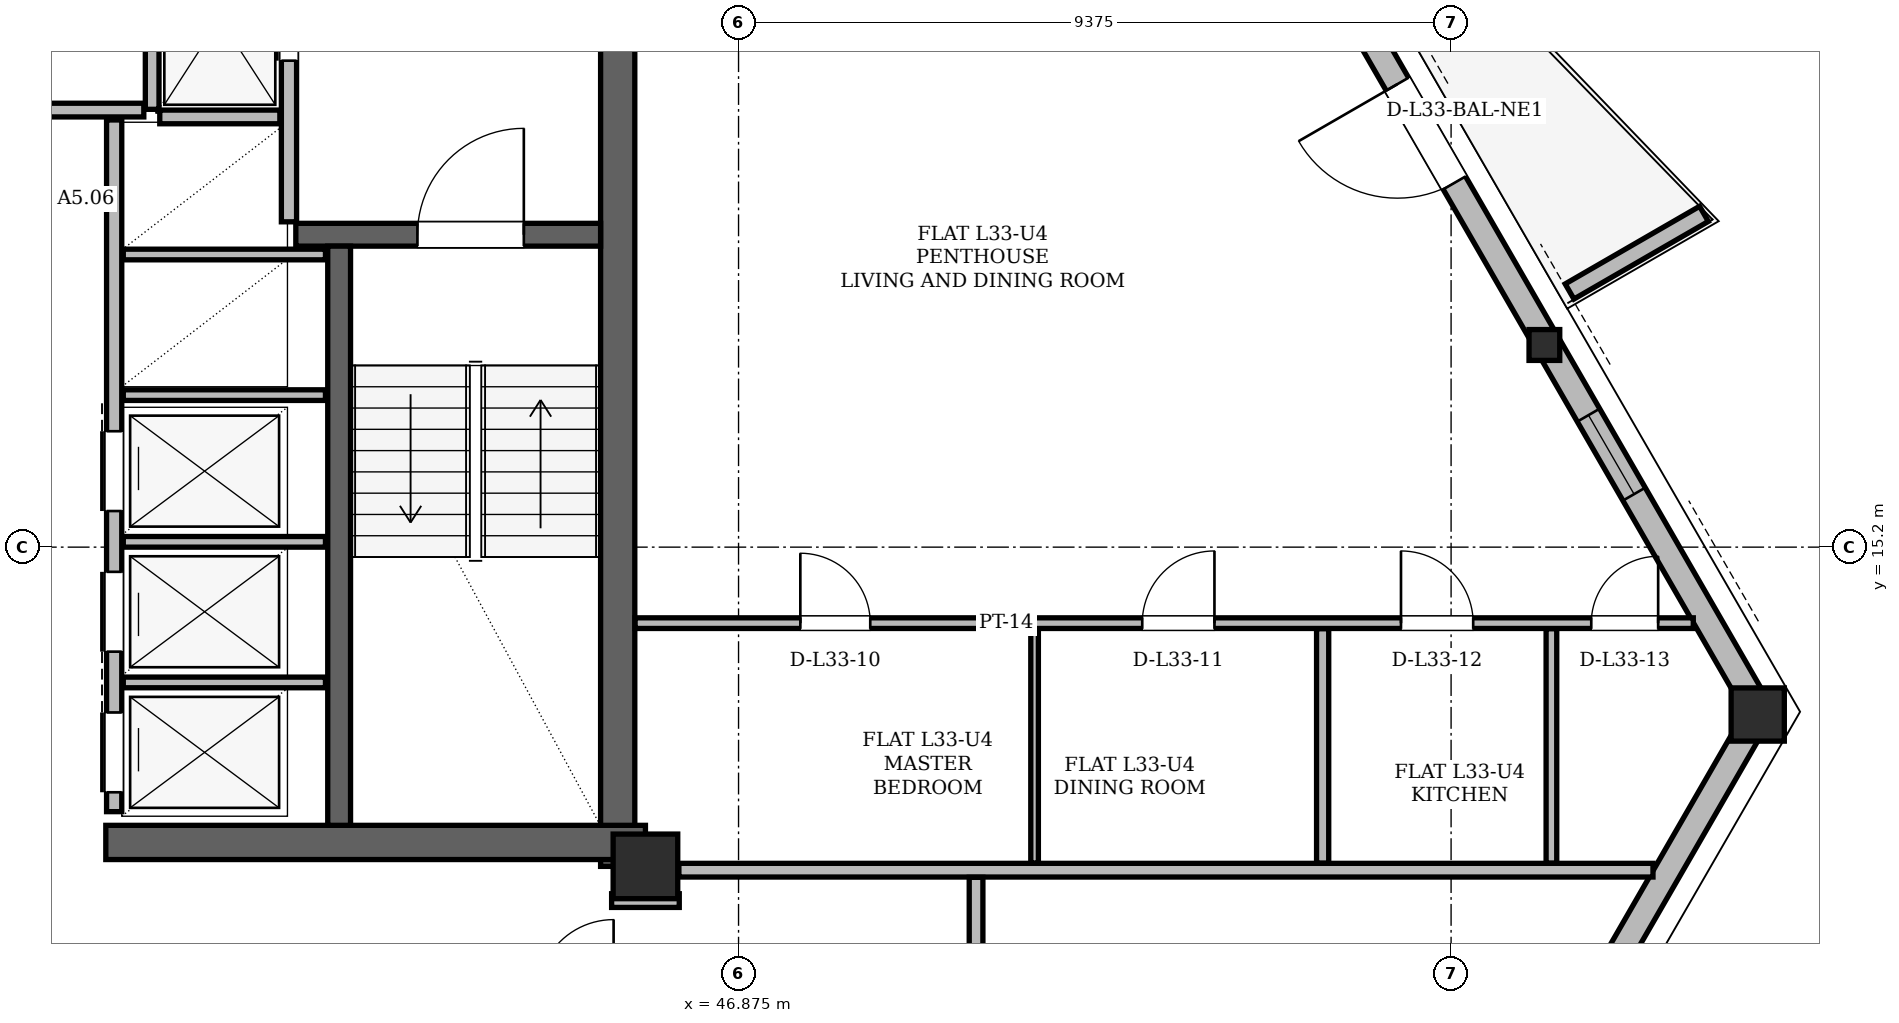
"""IFC4 building model, lengths in metres.
Left out: names, types, materials, properties, quantities, classifications, styles, units other than length and angle.
Written with IfcOpenShell. Run it as: python <this file> out.ifc"""

import sys

from ifc_helpers import new_model, si_unit, direction, frame, frame_2d, origin, origin_2d, place, context, subcontext, project, spatial, polyline, rectangle, hollow_rectangle, i_section, outline, extrude, element, fill, save


model = new_model("IFC4")
c1 = context("Model", 3, precision=1e-05, world=origin(), true_north=direction((0.0, 1.0)))
c2 = subcontext(c1, "Body", "Model", "MODEL_VIEW")
j1 = project(units=[si_unit("LENGTHUNIT", "METRE"), si_unit("PLANEANGLEUNIT", "RADIAN")], contexts=[c1])
p1 = place(None, origin())
s1 = spatial("IfcSite", under=j1, at=p1, CompositionType="ELEMENT")
p2 = place(p1, origin())
s2 = spatial("IfcBuilding", under=s1, at=p2, CompositionType="ELEMENT")
p3 = place(p2, frame((0.0, 0.0, 126.6)))
s3 = spatial("IfcBuildingStorey", under=s2, at=p3, CompositionType="ELEMENT", Elevation=126.6)
p4 = place(p3, frame((45.65, 11.0, 0.0), z_axis=(0.0, 0.0, 1.0), x_axis=(1.0, 0.0, 0.0)))
e1 = element("IfcColumn", 1, at=p4, inside=s3, PredefinedType="COLUMN", context=c2, shape_type="SweptSolid", body=[
    extrude(hollow_rectangle(XDim=0.85, YDim=0.85, WallThickness=0.07, at=origin_2d()), origin(), (0.0, 0.0, 1.0), 3.6),
])
p5 = place(p3, frame((60.311, 13.034, 0.004), z_axis=(-0.014612382171, -0.020117512198, 0.999690834203), x_axis=(0.809090542382, -0.587684008825, 0.0)))
e2 = element("IfcColumn", 2, at=p5, inside=s3, PredefinedType="COLUMN", context=c2, shape_type="SweptSolid", body=[
    extrude(hollow_rectangle(XDim=0.7, YDim=0.7, WallThickness=0.055, at=origin_2d()), origin(), (0.0, 0.0, 1.0), 3.592),
])
p6 = place(p3, frame((57.507, 17.891, 0.004), z_axis=(-0.01617604101, -0.017263505952, 0.999720114362), x_axis=(0.729716361997, -0.68374997699, 0.0)))
e3 = element("IfcColumn", 3, at=p6, inside=s3, PredefinedType="COLUMN", context=c2, shape_type="SweptSolid", body=[
    extrude(i_section(OverallWidth=0.404, OverallDepth=0.406, WebThickness=0.027, FlangeThickness=0.044, at=origin_2d()), origin(), (0.0, 0.0, 1.0), 3.592),
])
p7 = place(p3, frame((45.285, 11.0, 0.0), z_axis=(0.0, 0.0, 1.0), x_axis=(0.0, 1.0, 0.0)))
e4 = element("IfcWall", 4, at=p7, inside=s3, PredefinedType="SHEAR", context=c2, shape_type="SweptSolid", body=[
    extrude(rectangle(XDim=13.3, YDim=0.45, at=frame_2d((6.65, 0.0))), origin(), (0.0, 0.0, 1.0), 3.36),
])
p8 = place(p3, frame((38.55, 11.315, 0.0), z_axis=(0.0, 0.0, 1.0), x_axis=(1.0, 0.0, 0.0)))
e5 = element("IfcWall", 5, at=p8, inside=s3, PredefinedType="SHEAR", context=c2, shape_type="SweptSolid", body=[
    extrude(rectangle(XDim=7.1, YDim=0.45, at=frame_2d((3.55, 0.0))), origin(), (0.0, 0.0, 1.0), 3.36),
])
p9 = place(p3, frame((41.05, 19.31, 0.0), z_axis=(0.0, 0.0, 1.0), x_axis=(1.0, 0.0, 0.0)))
e6 = element("IfcWall", 6, at=p9, inside=s3, PredefinedType="SHEAR", context=c2, shape_type="SweptSolid", body=[
    extrude(rectangle(XDim=4.01, YDim=0.3, at=frame_2d((2.005, 0.0))), origin(), (0.0, 0.0, 1.0), 3.36),
])
p10 = place(p9, frame((1.6, 0.0, 0.0)))
e7 = element("IfcOpeningElement", 7, at=p10, cuts=e6, PredefinedType="OPENING", context=c2, shape_type="SweptSolid", body=[
    extrude(rectangle(XDim=1.4, YDim=2.2, at=frame_2d((0.7, 1.1))), frame((0.0, 0.15, 0.0), z_axis=(0.0, -1.0, 0.0), x_axis=(1.0, 0.0, 0.0)), (0.0, 0.0, 1.0), 0.3),
])
p11 = place(p3, frame((41.62, 11.54, 0.0), z_axis=(0.0, 0.0, 1.0), x_axis=(0.0, 1.0, 0.0)))
e8 = element("IfcWall", 8, at=p11, inside=s3, PredefinedType="SHEAR", context=c2, shape_type="SweptSolid", body=[
    extrude(rectangle(XDim=7.62, YDim=0.3, at=frame_2d((3.81, 0.0))), origin(), (0.0, 0.0, 1.0), 3.36),
])
p12 = place(p3, frame((55.024, 3.878, 0.0), z_axis=(0.0, 0.0, 1.0), x_axis=(0.500003640647, 0.866023301845, 0.0)))
e9 = element("IfcWall", 9, at=p12, inside=s3, PredefinedType="SOLIDWALL", context=c2, shape_type="SweptSolid", body=[
    extrude(rectangle(XDim=10.572, YDim=0.34, at=frame_2d((5.286, 0.0))), origin(), (0.0, 0.0, 1.0), 2.578),
])
p13 = place(p3, frame((60.311, 13.034, 0.0), z_axis=(0.0, 0.0, 1.0), x_axis=(-0.499998814518, 0.866026088222, 0.0)))
e10 = element("IfcWall", 10, at=p13, inside=s3, PredefinedType="SOLIDWALL", context=c2, shape_type="SweptSolid", body=[
    extrude(rectangle(XDim=35.049, YDim=0.34, at=frame_2d((17.524, 0.0))), origin(), (0.0, 0.0, 1.0), 2.578),
])
p14 = place(p13, frame((8.034, 0.0, 0.0)))
e11 = element("IfcOpeningElement", 11, at=p14, cuts=e10, PredefinedType="OPENING", context=c2, shape_type="SweptSolid", body=[
    extrude(rectangle(XDim=1.5, YDim=2.2, at=frame_2d((0.75, 1.1))), frame((0.0, 0.17, 0.0), z_axis=(0.0, -1.0, 0.0), x_axis=(1.0, 0.0, 0.0)), (0.0, 0.0, 1.0), 0.34),
])
p15 = place(p13, frame((26.969, 0.0, 0.0)))
e12 = element("IfcOpeningElement", 12, at=p15, cuts=e10, PredefinedType="OPENING", context=c2, shape_type="SweptSolid", body=[
    extrude(rectangle(XDim=1.5, YDim=2.2, at=frame_2d((0.75, 1.1))), frame((0.0, 0.17, 0.0), z_axis=(0.0, -1.0, 0.0), x_axis=(1.0, 0.0, 0.0)), (0.0, 0.0, 1.0), 0.34),
])
p16 = place(p13, frame((3.306, 0.0, 0.85)))
e13 = element("IfcOpeningElement", 13, at=p16, cuts=e10, PredefinedType="OPENING", context=c2, shape_type="SweptSolid", body=[
    extrude(rectangle(XDim=1.2, YDim=1.48, at=frame_2d((0.6, 0.74))), frame((0.0, 0.17, 0.0), z_axis=(0.0, -1.0, 0.0), x_axis=(1.0, 0.0, 0.0)), (0.0, 0.0, 1.0), 0.34),
])
p17 = place(p13, frame((11.475, 0.0, 0.85)))
e14 = element("IfcOpeningElement", 14, at=p17, cuts=e10, PredefinedType="OPENING", context=c2, shape_type="SweptSolid", body=[
    extrude(rectangle(XDim=1.2, YDim=1.48, at=frame_2d((0.6, 0.74))), frame((0.0, 0.17, 0.0), z_axis=(0.0, -1.0, 0.0), x_axis=(1.0, 0.0, 0.0)), (0.0, 0.0, 1.0), 0.34),
])
p18 = place(p13, frame((31.134, 0.0, 0.85)))
e15 = element("IfcOpeningElement", 15, at=p18, cuts=e10, PredefinedType="OPENING", context=c2, shape_type="SweptSolid", body=[
    extrude(rectangle(XDim=2.2, YDim=1.618, at=frame_2d((1.1, 0.809))), frame((0.0, 0.17, 0.0), z_axis=(0.0, -1.0, 0.0), x_axis=(1.0, 0.0, 0.0)), (0.0, 0.0, 1.0), 0.34),
])
p19 = place(p13, frame((14.213, 0.0, 0.85)))
e16 = element("IfcOpeningElement", 16, at=p19, cuts=e10, PredefinedType="OPENING", context=c2, shape_type="SweptSolid", body=[
    extrude(rectangle(XDim=2.6, YDim=1.618, at=frame_2d((1.3, 0.809))), frame((0.0, 0.17, 0.0), z_axis=(0.0, -1.0, 0.0), x_axis=(1.0, 0.0, 0.0)), (0.0, 0.0, 1.0), 0.34),
])
p20 = place(p13, frame((18.975, 0.0, 0.85)))
e17 = element("IfcOpeningElement", 17, at=p20, cuts=e10, PredefinedType="OPENING", context=c2, shape_type="SweptSolid", body=[
    extrude(rectangle(XDim=2.0, YDim=1.618, at=frame_2d((1.0, 0.809))), frame((0.0, 0.17, 0.0), z_axis=(0.0, -1.0, 0.0), x_axis=(1.0, 0.0, 0.0)), (0.0, 0.0, 1.0), 0.34),
])
p21 = place(p3, frame((57.809, 18.563, 0.0), z_axis=(0.0, 0.0, 1.0), x_axis=(0.866012356593, 0.500022597718, 0.0)))
e18 = element("IfcWall", 18, at=p21, inside=s3, PredefinedType="PARAPET", context=c2, shape_type="SweptSolid", body=[
    extrude(outline(polyline([(0.0, 0.0), (2.042, 0.0), (2.042, 1.1), (0.0, 1.32), (0.0, 0.0)])), frame((0.0, 0.115, 0.0), z_axis=(0.0, -1.0, 0.0), x_axis=(1.0, 0.0, 0.0)), (0.0, 0.0, 1.0), 0.23),
])
p22 = place(p3, frame((40.96, 19.48, 0.0), z_axis=(0.0, 0.0, 1.0), x_axis=(0.0, 1.0, 0.0)))
e19 = element("IfcWall", 19, at=p22, inside=s3, PredefinedType="PARTITIONING", context=c2, shape_type="SweptSolid", body=[
    extrude(rectangle(XDim=4.5, YDim=0.2, at=frame_2d((2.25, 0.0))), origin(), (0.0, 0.0, 1.0), 2.4),
])
p23 = place(p22, frame((2.12, 0.0, 0.0)))
e20 = element("IfcOpeningElement", 20, at=p23, cuts=e19, PredefinedType="OPENING", context=c2, shape_type="SweptSolid", body=[
    extrude(rectangle(XDim=1.1, YDim=2.2, at=frame_2d((0.55, 1.1))), frame((0.0, 0.1, 0.0), z_axis=(0.0, -1.0, 0.0), x_axis=(1.0, 0.0, 0.0)), (0.0, 0.0, 1.0), 0.2),
])
p24 = place(p3, frame((39.16, 20.96, 0.0), z_axis=(0.0, 0.0, 1.0), x_axis=(0.0, 1.0, 0.0)))
e21 = element("IfcWall", 21, at=p24, inside=s3, PredefinedType="PARTITIONING", context=c2, shape_type="SweptSolid", body=[
    extrude(rectangle(XDim=3.02, YDim=0.18, at=frame_2d((1.51, 0.0))), origin(), (0.0, 0.0, 1.0), 2.4),
])
p25 = place(p3, frame((39.26, 20.86, 0.0), z_axis=(0.0, 0.0, 1.0), x_axis=(1.0, 0.0, 0.0)))
e22 = element("IfcWall", 22, at=p25, inside=s3, PredefinedType="PARTITIONING", context=c2, shape_type="SweptSolid", body=[
    extrude(rectangle(XDim=1.58, YDim=0.18, at=frame_2d((0.79, 0.0))), origin(), (0.0, 0.0, 1.0), 3.36),
])
p26 = place(p3, frame((38.66, 11.72, 0.0), z_axis=(0.0, 0.0, 1.0), x_axis=(0.0, 1.0, 0.0)))
e23 = element("IfcWall", 23, at=p26, inside=s3, PredefinedType="PARTITIONING", context=c2, shape_type="SweptSolid", body=[
    extrude(rectangle(XDim=9.1, YDim=0.2, at=frame_2d((4.55, 0.0))), origin(), (0.0, 0.0, 1.0), 3.36),
])
p27 = place(p26, frame((0.255, 0.0, 0.0)))
e24 = element("IfcOpeningElement", 24, at=p27, cuts=e23, PredefinedType="OPENING", context=c2, shape_type="SweptSolid", body=[
    extrude(rectangle(XDim=1.05, YDim=2.15, at=frame_2d((0.525, 1.075))), frame((0.0, 0.1, 0.0), z_axis=(0.0, -1.0, 0.0), x_axis=(1.0, 0.0, 0.0)), (0.0, 0.0, 1.0), 0.2),
])
p28 = place(p26, frame((2.105, 0.0, 0.0)))
e25 = element("IfcOpeningElement", 25, at=p28, cuts=e23, PredefinedType="OPENING", context=c2, shape_type="SweptSolid", body=[
    extrude(rectangle(XDim=1.05, YDim=2.15, at=frame_2d((0.525, 1.075))), frame((0.0, 0.1, 0.0), z_axis=(0.0, -1.0, 0.0), x_axis=(1.0, 0.0, 0.0)), (0.0, 0.0, 1.0), 0.2),
])
p29 = place(p26, frame((3.955, 0.0, 0.0)))
e26 = element("IfcOpeningElement", 26, at=p29, cuts=e23, PredefinedType="OPENING", context=c2, shape_type="SweptSolid", body=[
    extrude(rectangle(XDim=1.05, YDim=2.15, at=frame_2d((0.525, 1.075))), frame((0.0, 0.1, 0.0), z_axis=(0.0, -1.0, 0.0), x_axis=(1.0, 0.0, 0.0)), (0.0, 0.0, 1.0), 0.2),
])
for number, where, z_axis, x_axis in (
    (27, (38.78, 13.42, 0.0), (0.0, 0.0, 1.0), (1.0, 0.0, 0.0)),
    (28, (38.78, 15.27, 0.0), (0.0, 0.0, 1.0), (1.0, 0.0, 0.0)),
    (29, (38.78, 17.2, 0.0), (0.0, 0.0, 1.0), (1.0, 0.0, 0.0)),
    (30, (38.78, 19.05, 0.0), (0.0, 0.0, 1.0), (1.0, 0.0, 0.0)),
):
    element("IfcWall", number, at=place(p3, frame(where, z_axis=z_axis, x_axis=x_axis)), inside=s3, PredefinedType="PARTITIONING", context=c2, shape_type="SweptSolid", body=[
        extrude(rectangle(XDim=2.66, YDim=0.14, at=frame_2d((1.33, 0.0))), origin(), (0.0, 0.0, 1.0), 3.36),
    ])
p30 = place(p3, frame((35.95, 20.95, 0.0), z_axis=(0.0, 0.0, 1.0), x_axis=(1.0, 0.0, 0.0)))
e31 = element("IfcWall", 31, at=p30, inside=s3, PredefinedType="PARTITIONING", context=c2, shape_type="SweptSolid", body=[
    extrude(rectangle(XDim=3.1, YDim=0.18, at=frame_2d((1.55, 0.0))), origin(), (0.0, 0.0, 1.0), 3.36),
])
p31 = place(p3, frame((45.205, 10.55, 0.0), z_axis=(0.0, 0.0, 1.0), x_axis=(1.0, 0.0, 0.0)))
e32 = element("IfcWall", 32, at=p31, inside=s3, PredefinedType="PARTITIONING", context=c2, shape_type="SweptSolid", body=[
    extrude(rectangle(XDim=0.89, YDim=0.18, at=frame_2d((0.445, 0.0))), origin(), (0.0, 0.0, 1.0), 3.36),
])
p32 = place(p3, frame((46.09, 10.95, 0.0), z_axis=(0.0, 0.0, 1.0), x_axis=(1.0, 0.0, 0.0)))
e33 = element("IfcWall", 33, at=p32, inside=s3, PredefinedType="PARTITIONING", context=c2, shape_type="SweptSolid", body=[
    extrude(rectangle(XDim=12.816, YDim=0.18, at=frame_2d((6.408, 0.0))), origin(), (0.0, 0.0, 1.0), 2.814),
])
p33 = place(p3, frame((45.514, 14.2, 0.0), z_axis=(0.0, 0.0, 1.0), x_axis=(1.0, 0.0, 0.0)))
e34 = element("IfcWall", 34, at=p33, inside=s3, PredefinedType="PARTITIONING", context=c2, shape_type="SweptSolid", body=[
    extrude(rectangle(XDim=13.923, YDim=0.14, at=frame_2d((6.961, 0.0))), origin(), (0.0, 0.0, 1.0), 2.4),
])
p34 = place(p33, frame((2.174, 0.0, 0.0)))
e35 = element("IfcOpeningElement", 35, at=p34, cuts=e34, PredefinedType="OPENING", context=c2, shape_type="SweptSolid", body=[
    extrude(rectangle(XDim=0.92, YDim=2.12, at=frame_2d((0.46, 1.06))), frame((0.0, 0.07, 0.0), z_axis=(0.0, -1.0, 0.0), x_axis=(1.0, 0.0, 0.0)), (0.0, 0.0, 1.0), 0.14),
])
p35 = place(p33, frame((6.673, 0.0, 0.0)))
e36 = element("IfcOpeningElement", 36, at=p35, cuts=e34, PredefinedType="OPENING", context=c2, shape_type="SweptSolid", body=[
    extrude(rectangle(XDim=0.95, YDim=2.1, at=frame_2d((0.475, 1.05))), frame((0.0, 0.07, 0.0), z_axis=(0.0, -1.0, 0.0), x_axis=(1.0, 0.0, 0.0)), (0.0, 0.0, 1.0), 0.14),
])
p36 = place(p33, frame((10.077, 0.0, 0.0)))
e37 = element("IfcOpeningElement", 37, at=p36, cuts=e34, PredefinedType="OPENING", context=c2, shape_type="SweptSolid", body=[
    extrude(rectangle(XDim=0.95, YDim=2.1, at=frame_2d((0.475, 1.05))), frame((0.0, 0.07, 0.0), z_axis=(0.0, -1.0, 0.0), x_axis=(1.0, 0.0, 0.0)), (0.0, 0.0, 1.0), 0.14),
])
p37 = place(p33, frame((12.58, 0.0, 0.0)))
e38 = element("IfcOpeningElement", 38, at=p37, cuts=e34, PredefinedType="OPENING", context=c2, shape_type="SweptSolid", body=[
    extrude(rectangle(XDim=0.88, YDim=2.08, at=frame_2d((0.44, 1.04))), frame((0.0, 0.07, 0.0), z_axis=(0.0, -1.0, 0.0), x_axis=(1.0, 0.0, 0.0)), (0.0, 0.0, 1.0), 0.14),
])
p38 = place(p3, frame((50.0, 9.394, 0.0), z_axis=(0.0, 0.0, 1.0), x_axis=(0.0, 1.0, 0.0)))
e39 = element("IfcWall", 39, at=p38, inside=s3, PredefinedType="PARTITIONING", context=c2, shape_type="SweptSolid", body=[
    extrude(rectangle(XDim=1.462, YDim=0.18, at=frame_2d((0.731, 0.0))), origin(), (0.0, 0.0, 1.0), 3.36),
])
p39 = place(p3, frame((50.77, 11.044, 0.0), z_axis=(0.0, 0.0, 1.0), x_axis=(0.0, 1.0, 0.0)))
e40 = element("IfcWall", 40, at=p39, inside=s3, PredefinedType="PARTITIONING", context=c2, shape_type="SweptSolid", body=[
    extrude(rectangle(XDim=3.082, YDim=0.1, at=frame_2d((1.541, 0.0))), origin(), (0.0, 0.0, 1.0), 2.814),
])
p40 = place(p3, frame((54.56, 11.044, 0.0), z_axis=(0.0, 0.0, 1.0), x_axis=(0.0, 1.0, 0.0)))
e41 = element("IfcWall", 41, at=p40, inside=s3, PredefinedType="PARTITIONING", context=c2, shape_type="SweptSolid", body=[
    extrude(rectangle(XDim=3.082, YDim=0.16, at=frame_2d((1.541, 0.0))), origin(), (0.0, 0.0, 1.0), 2.814),
])
p41 = place(p3, frame((57.57, 11.044, 0.0), z_axis=(0.0, 0.0, 1.0), x_axis=(0.0, 1.0, 0.0)))
e42 = element("IfcWall", 42, at=p41, inside=s3, PredefinedType="PARTITIONING", context=c2, shape_type="SweptSolid", body=[
    extrude(rectangle(XDim=3.082, YDim=0.14, at=frame_2d((1.541, 0.0))), origin(), (0.0, 0.0, 1.0), 2.814),
])
p42 = place(p14, origin())
e43 = element("IfcDoor", 43, at=p42, inside=s3, OperationType="SINGLE_SWING_RIGHT", PredefinedType="DOOR", context=c2, shape_type="SweptSolid", body=[
    extrude(rectangle(XDim=1.5, YDim=2.2, at=frame_2d((0.75, 1.1))), frame((0.0, 0.025, 0.0), z_axis=(0.0, -1.0, 0.0), x_axis=(1.0, 0.0, 0.0)), (0.0, 0.0, 1.0), 0.05),
])
fill(e11, e43)
p43 = place(p16, origin())
e44 = element("IfcWindow", 44, at=p43, inside=s3, PartitioningType="SINGLE_PANEL", PredefinedType="WINDOW", context=c2, shape_type="SweptSolid", body=[
    extrude(rectangle(XDim=1.2, YDim=1.48, at=frame_2d((0.6, 0.74))), frame((0.0, 0.03, 0.0), z_axis=(0.0, -1.0, 0.0), x_axis=(1.0, 0.0, 0.0)), (0.0, 0.0, 1.0), 0.06),
])
fill(e13, e44)
p44 = place(p23, origin())
e45 = element("IfcDoor", 45, at=p44, inside=s3, OperationType="SLIDING_TO_RIGHT", PredefinedType="DOOR", context=c2, shape_type="SweptSolid", body=[
    extrude(rectangle(XDim=1.1, YDim=2.2, at=frame_2d((0.55, 1.1))), frame((0.0, 0.025, 0.0), z_axis=(0.0, -1.0, 0.0), x_axis=(1.0, 0.0, 0.0)), (0.0, 0.0, 1.0), 0.05),
])
fill(e20, e45)
p45 = place(p27, origin())
e46 = element("IfcDoor", 46, at=p45, inside=s3, OperationType="SLIDING_TO_RIGHT", PredefinedType="DOOR", context=c2, shape_type="SweptSolid", body=[
    extrude(rectangle(XDim=1.05, YDim=2.15, at=frame_2d((0.525, 1.075))), frame((0.0, 0.025, 0.0), z_axis=(0.0, -1.0, 0.0), x_axis=(1.0, 0.0, 0.0)), (0.0, 0.0, 1.0), 0.05),
])
fill(e24, e46)
p46 = place(p28, origin())
e47 = element("IfcDoor", 47, at=p46, inside=s3, OperationType="SLIDING_TO_LEFT", PredefinedType="DOOR", context=c2, shape_type="SweptSolid", body=[
    extrude(rectangle(XDim=1.05, YDim=2.15, at=frame_2d((0.525, 1.075))), frame((0.0, 0.025, 0.0), z_axis=(0.0, -1.0, 0.0), x_axis=(1.0, 0.0, 0.0)), (0.0, 0.0, 1.0), 0.05),
])
fill(e25, e47)
p47 = place(p29, origin())
e48 = element("IfcDoor", 48, at=p47, inside=s3, OperationType="SLIDING_TO_RIGHT", PredefinedType="DOOR", context=c2, shape_type="SweptSolid", body=[
    extrude(rectangle(XDim=1.05, YDim=2.15, at=frame_2d((0.525, 1.075))), frame((0.0, 0.025, 0.0), z_axis=(0.0, -1.0, 0.0), x_axis=(1.0, 0.0, 0.0)), (0.0, 0.0, 1.0), 0.05),
])
fill(e26, e48)
p48 = place(p10, origin())
e49 = element("IfcDoor", 49, at=p48, inside=s3, OperationType="SINGLE_SWING_RIGHT", PredefinedType="DOOR", context=c2, shape_type="SweptSolid", body=[
    extrude(rectangle(XDim=1.4, YDim=2.2, at=frame_2d((0.7, 1.1))), frame((0.0, 0.025, 0.0), z_axis=(0.0, -1.0, 0.0), x_axis=(1.0, 0.0, 0.0)), (0.0, 0.0, 1.0), 0.05),
])
fill(e7, e49)
p49 = place(p34, origin())
e50 = element("IfcDoor", 50, at=p49, inside=s3, OperationType="SINGLE_SWING_LEFT", PredefinedType="DOOR", context=c2, shape_type="SweptSolid", body=[
    extrude(rectangle(XDim=0.92, YDim=2.12, at=frame_2d((0.46, 1.06))), frame((0.0, 0.025, 0.0), z_axis=(0.0, -1.0, 0.0), x_axis=(1.0, 0.0, 0.0)), (0.0, 0.0, 1.0), 0.05),
])
fill(e35, e50)
p50 = place(p35, origin())
e51 = element("IfcDoor", 51, at=p50, inside=s3, OperationType="SINGLE_SWING_RIGHT", PredefinedType="DOOR", context=c2, shape_type="SweptSolid", body=[
    extrude(rectangle(XDim=0.95, YDim=2.1, at=frame_2d((0.475, 1.05))), frame((0.0, 0.025, 0.0), z_axis=(0.0, -1.0, 0.0), x_axis=(1.0, 0.0, 0.0)), (0.0, 0.0, 1.0), 0.05),
])
fill(e36, e51)
p51 = place(p36, origin())
e52 = element("IfcDoor", 52, at=p51, inside=s3, OperationType="SINGLE_SWING_LEFT", PredefinedType="DOOR", context=c2, shape_type="SweptSolid", body=[
    extrude(rectangle(XDim=0.95, YDim=2.1, at=frame_2d((0.475, 1.05))), frame((0.0, 0.025, 0.0), z_axis=(0.0, -1.0, 0.0), x_axis=(1.0, 0.0, 0.0)), (0.0, 0.0, 1.0), 0.05),
])
fill(e37, e52)
p52 = place(p37, origin())
e53 = element("IfcDoor", 53, at=p52, inside=s3, OperationType="SINGLE_SWING_RIGHT", PredefinedType="DOOR", context=c2, shape_type="SweptSolid", body=[
    extrude(rectangle(XDim=0.88, YDim=2.08, at=frame_2d((0.44, 1.04))), frame((0.0, 0.025, 0.0), z_axis=(0.0, -1.0, 0.0), x_axis=(1.0, 0.0, 0.0)), (0.0, 0.0, 1.0), 0.05),
])
fill(e38, e53)
save(model, sys.argv[1])
